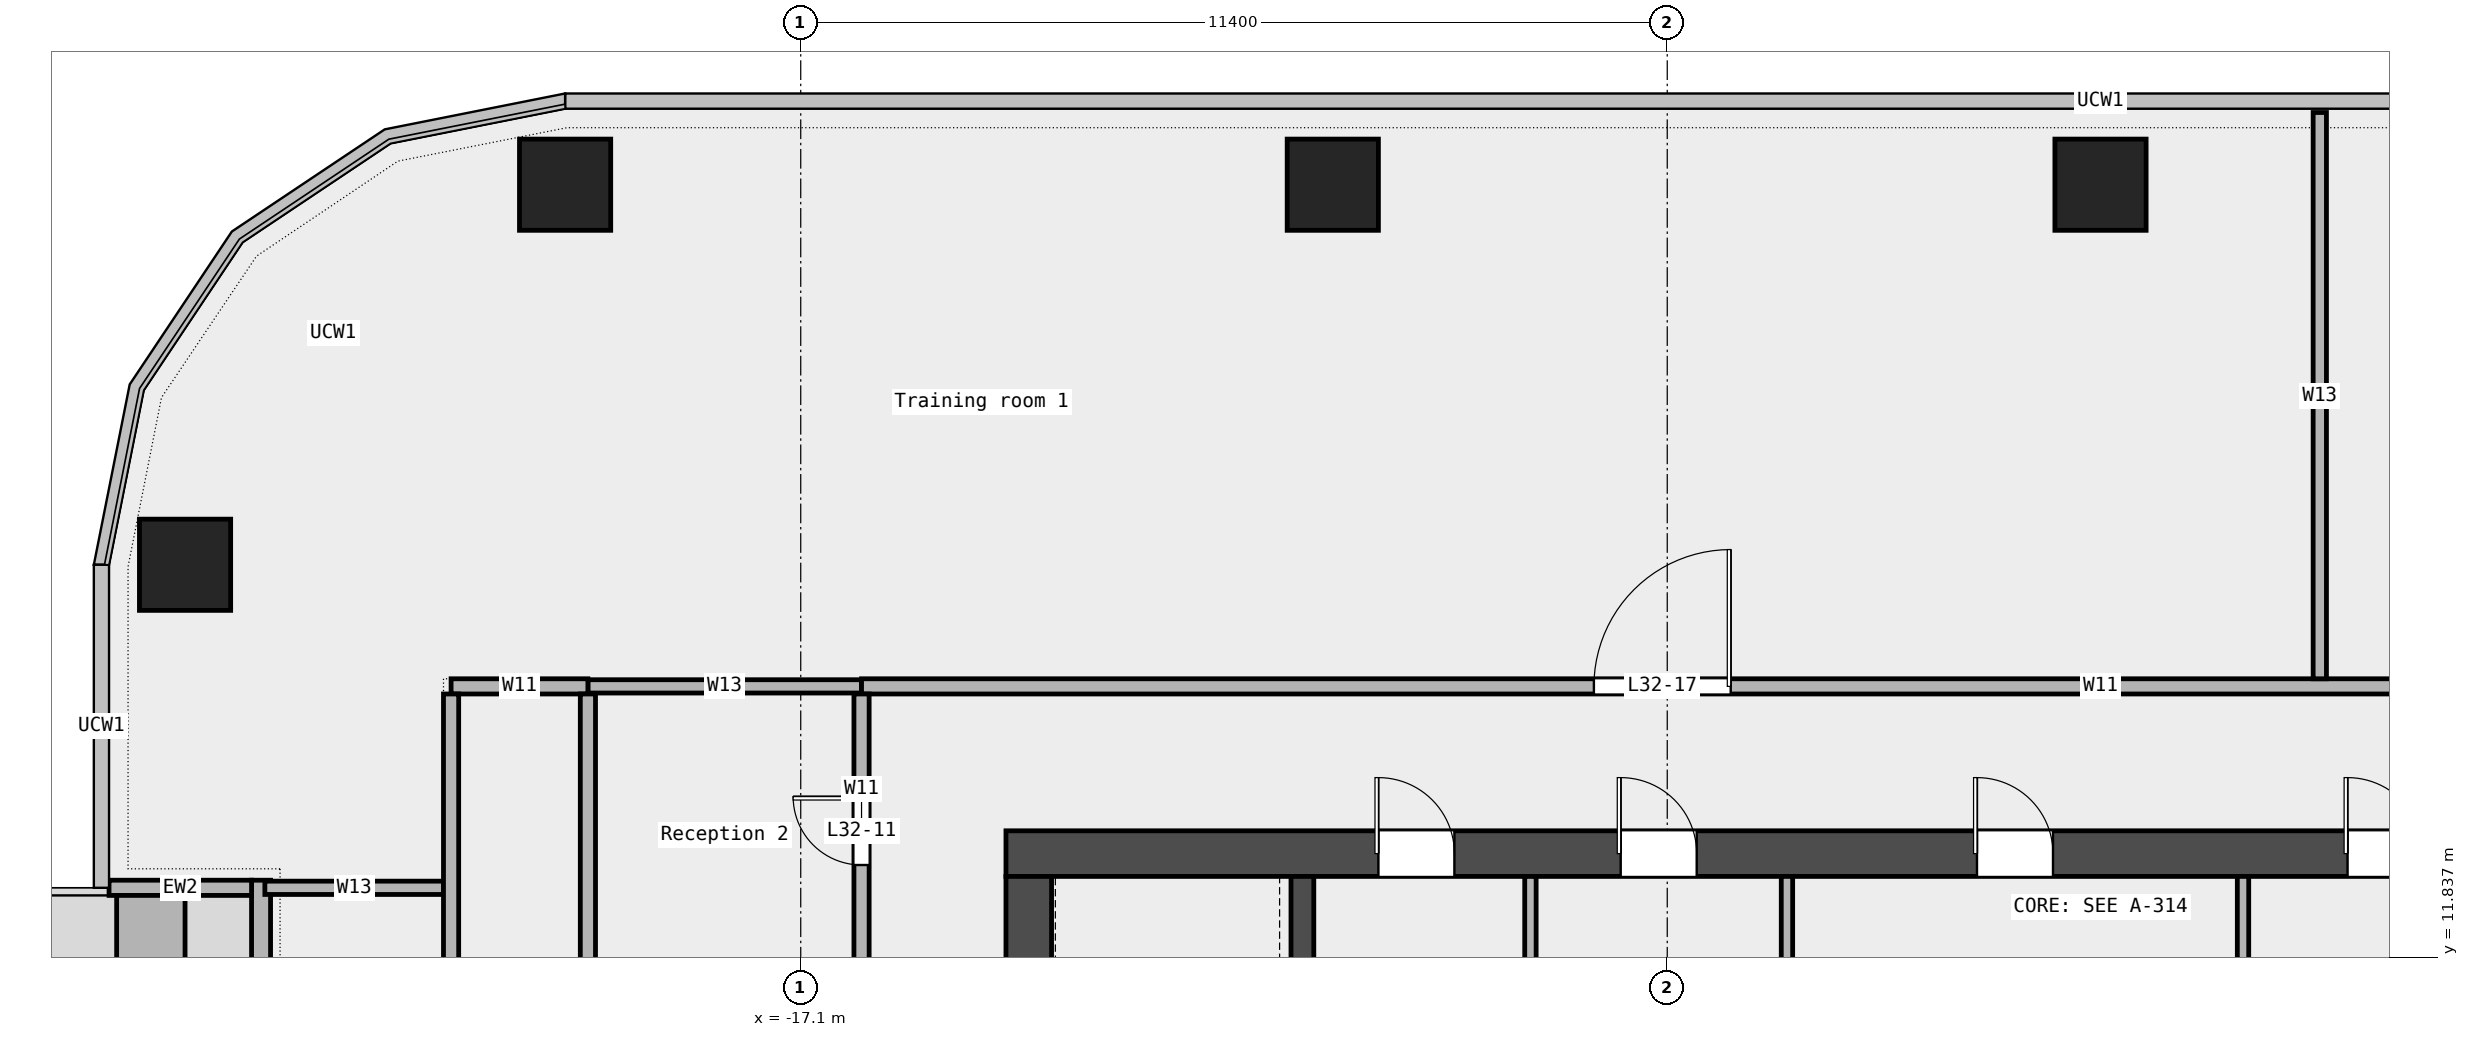
"""IFC4 building model, lengths in metres.
Left out: names, types, materials, properties, quantities, classifications, styles, units other than length and angle.
Written with IfcOpenShell. Run it as: python <this file> out.ifc"""

import sys

from ifc_helpers import new_model, si_unit, direction, frame, frame_2d, origin, origin_2d, place, context, subcontext, project, spatial, rectangle, extrude, element, fill, save


model = new_model("IFC4")
c1 = context("Model", 3, precision=1e-05, world=origin(), true_north=direction((0.0, 1.0)))
c2 = subcontext(c1, "Body", "Model", "MODEL_VIEW")
j1 = project(units=[si_unit("LENGTHUNIT", "METRE"), si_unit("PLANEANGLEUNIT", "RADIAN")], contexts=[c1])
p1 = place(None, origin())
s1 = spatial("IfcSite", under=j1, at=p1, CompositionType="ELEMENT")
p2 = place(p1, origin())
s2 = spatial("IfcBuilding", under=s1, at=p2, CompositionType="ELEMENT")
p3 = place(p2, frame((0.0, 0.0, 161.0)))
s3 = spatial("IfcBuildingStorey", under=s2, at=p3, CompositionType="ELEMENT", Elevation=161.0)
for number, where, z_axis, x_axis in (
    (1, (0.0, 22.0, 0.0), (0.0, 0.0, 1.0), (1.0, 0.0, 0.0)),
    (2, (-10.1, 22.0, 0.0), (0.0, 0.0, 1.0), (1.0, 0.0, 0.0)),
    (3, (-20.2, 22.0, 0.0), (0.0, 0.0, 1.0), (1.0, 0.0, 0.0)),
    (4, (-25.2, 17.0, 0.0), (0.0, 0.0, 1.0), (1.0, 0.0, 0.0)),
):
    element("IfcColumn", number, at=place(p3, frame(where, z_axis=z_axis, x_axis=x_axis)), inside=s3, PredefinedType="COLUMN", context=c2, shape_type="SweptSolid", body=[
        extrude(rectangle(XDim=1.2, YDim=1.2, at=origin_2d()), origin(), (0.0, 0.0, 1.0), 3.6),
    ])
p4 = place(p3, frame((-24.2, 12.85, 0.0), z_axis=(0.0, 0.0, 1.0), x_axis=(0.0, -1.0, 0.0)))
e5 = element("IfcWall", 5, at=p4, inside=s3, PredefinedType="STANDARD", context=c2, shape_type="SweptSolid", body=[
    extrude(rectangle(XDim=12.95, YDim=0.25, at=frame_2d((6.475, 0.0))), origin(), (0.0, 0.0, 1.0), 3.6),
])
p5 = place(p4, frame((1.5, 0.0, 0.45)))
e6 = element("IfcOpeningElement", 6, at=p5, cuts=e5, PredefinedType="OPENING", context=c2, shape_type="SweptSolid", body=[
    extrude(rectangle(XDim=1.5, YDim=2.4, at=frame_2d((0.75, 1.2))), frame((0.0, 0.137, 0.0), z_axis=(0.0, -1.0, 0.0), x_axis=(1.0, 0.0, 0.0)), (0.0, 0.0, 1.0), 0.274),
])
p6 = place(p4, frame((4.25, 0.0, 0.0)))
e7 = element("IfcOpeningElement", 7, at=p6, cuts=e5, PredefinedType="OPENING", context=c2, shape_type="SweptSolid", body=[
    extrude(rectangle(XDim=1.8, YDim=2.4, at=frame_2d((0.9, 1.2))), frame((0.0, 0.137, 0.0), z_axis=(0.0, -1.0, 0.0), x_axis=(1.0, 0.0, 0.0)), (0.0, 0.0, 1.0), 0.274),
])
p7 = place(p4, frame((10.0, 0.0, 0.45)))
e8 = element("IfcOpeningElement", 8, at=p7, cuts=e5, PredefinedType="OPENING", context=c2, shape_type="SweptSolid", body=[
    extrude(rectangle(XDim=1.5, YDim=2.4, at=frame_2d((0.75, 1.2))), frame((0.0, 0.137, 0.0), z_axis=(0.0, -1.0, 0.0), x_axis=(1.0, 0.0, 0.0)), (0.0, 0.0, 1.0), 0.274),
])
p8 = place(p3, frame((-26.2, 12.75, 0.0), z_axis=(0.0, 0.0, 1.0), x_axis=(1.0, 0.0, 0.0)))
e9 = element("IfcWall", 9, at=p8, inside=s3, PredefinedType="STANDARD", context=c2, shape_type="SweptSolid", body=[
    extrude(rectangle(XDim=1.875, YDim=0.2, at=frame_2d((0.938, 0.0))), origin(), (0.0, 0.0, 1.0), 3.6),
])
p9 = place(p3, frame((-25.65, 12.65, 0.0), z_axis=(0.0, 0.0, 1.0), x_axis=(0.0, -1.0, 0.0)))
e10 = element("IfcWall", 10, at=p9, inside=s3, PredefinedType="STANDARD", context=c2, shape_type="SweptSolid", body=[
    extrude(rectangle(XDim=3.6, YDim=0.9, at=frame_2d((1.8, 0.0))), origin(), (0.0, 0.0, 1.0), 0.7),
])
p10 = place(p3, frame((-24.15, 12.75, 0.0), z_axis=(0.0, 0.0, 1.0), x_axis=(1.0, 0.0, 0.0)))
e11 = element("IfcWall", 11, at=p10, inside=s3, PredefinedType="PARTITIONING", context=c2, shape_type="SweptSolid", body=[
    extrude(rectangle(XDim=2.35, YDim=0.175, at=frame_2d((1.175, 0.0))), origin(), (0.0, 0.0, 1.0), 3.6),
])
p11 = place(p3, frame((-19.9, 15.4, 0.0), z_axis=(0.0, 0.0, 1.0), x_axis=(1.0, 0.0, 0.0)))
e12 = element("IfcWall", 12, at=p11, inside=s3, PredefinedType="PARTITIONING", context=c2, shape_type="SweptSolid", body=[
    extrude(rectangle(XDim=3.6, YDim=0.175, at=frame_2d((1.8, 0.0))), origin(), (0.0, 0.0, 1.0), 3.6),
])
p12 = place(p3, frame((-21.7, 15.4, 0.0), z_axis=(0.0, 0.0, 1.0), x_axis=(1.0, 0.0, 0.0)))
e13 = element("IfcWall", 13, at=p12, inside=s3, PredefinedType="PARTITIONING", context=c2, shape_type="SweptSolid", body=[
    extrude(rectangle(XDim=1.8, YDim=0.2, at=frame_2d((0.9, 0.0))), origin(), (0.0, 0.0, 1.0), 3.6),
])
p13 = place(p3, frame((-16.3, 15.4, 0.0), z_axis=(0.0, 0.0, 1.0), x_axis=(1.0, 0.0, 0.0)))
e14 = element("IfcWall", 14, at=p13, inside=s3, PredefinedType="PARTITIONING", context=c2, shape_type="SweptSolid", body=[
    extrude(rectangle(XDim=32.6, YDim=0.2, at=frame_2d((16.3, 0.0))), origin(), (0.0, 0.0, 1.0), 3.6),
])
p14 = place(p13, frame((24.992, 0.0, 0.0)))
e15 = element("IfcOpeningElement", 15, at=p14, cuts=e14, PredefinedType="OPENING", context=c2, shape_type="SweptSolid", body=[
    extrude(rectangle(XDim=1.8, YDim=2.1, at=frame_2d((0.9, 1.05))), frame((0.0, 0.112, 0.0), z_axis=(0.0, -1.0, 0.0), x_axis=(1.0, 0.0, 0.0)), (0.0, 0.0, 1.0), 0.224),
])
p15 = place(p13, frame((9.635, 0.0, 0.0)))
e16 = element("IfcOpeningElement", 16, at=p15, cuts=e14, PredefinedType="OPENING", context=c2, shape_type="SweptSolid", body=[
    extrude(rectangle(XDim=1.8, YDim=2.1, at=frame_2d((0.9, 1.05))), frame((0.0, 0.112, 0.0), z_axis=(0.0, -1.0, 0.0), x_axis=(1.0, 0.0, 0.0)), (0.0, 0.0, 1.0), 0.224),
])
p16 = place(p3, frame((-21.7, -9.0, 0.0), z_axis=(0.0, 0.0, 1.0), x_axis=(0.0, 1.0, 0.0)))
e17 = element("IfcWall", 17, at=p16, inside=s3, PredefinedType="PARTITIONING", context=c2, shape_type="SweptSolid", body=[
    extrude(rectangle(XDim=24.3, YDim=0.2, at=frame_2d((12.15, 0.0))), origin(), (0.0, 0.0, 1.0), 3.6),
])
p17 = place(p16, frame((14.925, 0.0, 0.0)))
e18 = element("IfcOpeningElement", 18, at=p17, cuts=e17, PredefinedType="OPENING", context=c2, shape_type="SweptSolid", body=[
    extrude(rectangle(XDim=0.9, YDim=2.1, at=frame_2d((0.45, 1.05))), frame((0.0, 0.112, 0.0), z_axis=(0.0, -1.0, 0.0), x_axis=(1.0, 0.0, 0.0)), (0.0, 0.0, 1.0), 0.224),
])
p18 = place(p16, frame((4.05, 0.0, 0.0)))
e19 = element("IfcOpeningElement", 19, at=p18, cuts=e17, PredefinedType="OPENING", context=c2, shape_type="SweptSolid", body=[
    extrude(rectangle(XDim=0.9, YDim=2.1, at=frame_2d((0.45, 1.05))), frame((0.0, 0.112, 0.0), z_axis=(0.0, -1.0, 0.0), x_axis=(1.0, 0.0, 0.0)), (0.0, 0.0, 1.0), 0.224),
])
p19 = place(p3, frame((-19.9, 4.15, 0.0), z_axis=(0.0, 0.0, 1.0), x_axis=(0.0, 1.0, 0.0)))
e20 = element("IfcWall", 20, at=p19, inside=s3, PredefinedType="PARTITIONING", context=c2, shape_type="SweptSolid", body=[
    extrude(rectangle(XDim=11.15, YDim=0.2, at=frame_2d((5.575, 0.0))), origin(), (0.0, 0.0, 1.0), 3.6),
])
p20 = place(p3, frame((-16.3, 11.7, 0.0), z_axis=(0.0, 0.0, 1.0), x_axis=(0.0, 1.0, 0.0)))
e21 = element("IfcWall", 21, at=p20, inside=s3, PredefinedType="PARTITIONING", context=c2, shape_type="SweptSolid", body=[
    extrude(rectangle(XDim=3.6, YDim=0.2, at=frame_2d((1.8, 0.0))), origin(), (0.0, 0.0, 1.0), 3.6),
])
p21 = place(p20, frame((1.35, 0.0, 0.0)))
e22 = element("IfcOpeningElement", 22, at=p21, cuts=e21, PredefinedType="OPENING", context=c2, shape_type="SweptSolid", body=[
    extrude(rectangle(XDim=0.9, YDim=2.1, at=frame_2d((0.45, 1.05))), frame((0.0, 0.112, 0.0), z_axis=(0.0, -1.0, 0.0), x_axis=(1.0, 0.0, 0.0)), (0.0, 0.0, 1.0), 0.224),
])
p22 = place(p3, frame((2.885, 15.5, 0.0), z_axis=(0.0, 0.0, 1.0), x_axis=(0.0, 1.0, 0.0)))
e23 = element("IfcWall", 23, at=p22, inside=s3, PredefinedType="PARTITIONING", context=c2, shape_type="SweptSolid", body=[
    extrude(rectangle(XDim=7.45, YDim=0.175, at=frame_2d((3.725, 0.0))), origin(), (0.0, 0.0, 1.0), 3.6),
])
p23 = place(p3, frame((-14.4, 13.2, 0.0), z_axis=(0.0, 0.0, 1.0), x_axis=(1.0, 0.0, 0.0)))
e24 = element("IfcWall", 24, at=p23, inside=s3, PredefinedType="SHEAR", context=c2, shape_type="SweptSolid", body=[
    extrude(rectangle(XDim=28.8, YDim=0.6, at=frame_2d((14.4, 0.0))), origin(), (0.0, 0.0, 1.0), 3.7),
])
p24 = place(p23, frame((4.9, 0.0, 0.0)))
e25 = element("IfcOpeningElement", 25, at=p24, cuts=e24, PredefinedType="OPENING", context=c2, shape_type="SweptSolid", body=[
    extrude(rectangle(XDim=1.0, YDim=2.1, at=frame_2d((0.5, 1.05))), frame((0.0, 0.312, 0.0), z_axis=(0.0, -1.0, 0.0), x_axis=(1.0, 0.0, 0.0)), (0.0, 0.0, 1.0), 0.624),
])
p25 = place(p23, frame((8.087, 0.0, 0.0)))
e26 = element("IfcOpeningElement", 26, at=p25, cuts=e24, PredefinedType="OPENING", context=c2, shape_type="SweptSolid", body=[
    extrude(rectangle(XDim=1.0, YDim=2.1, at=frame_2d((0.5, 1.05))), frame((0.0, 0.312, 0.0), z_axis=(0.0, -1.0, 0.0), x_axis=(1.0, 0.0, 0.0)), (0.0, 0.0, 1.0), 0.624),
])
p26 = place(p23, frame((12.775, 0.0, 0.0)))
e27 = element("IfcOpeningElement", 27, at=p26, cuts=e24, PredefinedType="OPENING", context=c2, shape_type="SweptSolid", body=[
    extrude(rectangle(XDim=1.0, YDim=2.1, at=frame_2d((0.5, 1.05))), frame((0.0, 0.312, 0.0), z_axis=(0.0, -1.0, 0.0), x_axis=(1.0, 0.0, 0.0)), (0.0, 0.0, 1.0), 0.624),
])
p27 = place(p23, frame((17.65, 0.0, 0.0)))
e28 = element("IfcOpeningElement", 28, at=p27, cuts=e24, PredefinedType="OPENING", context=c2, shape_type="SweptSolid", body=[
    extrude(rectangle(XDim=1.0, YDim=2.1, at=frame_2d((0.5, 1.05))), frame((0.0, 0.312, 0.0), z_axis=(0.0, -1.0, 0.0), x_axis=(1.0, 0.0, 0.0)), (0.0, 0.0, 1.0), 0.624),
])
p28 = place(p23, frame((21.962, 0.0, 0.0)))
e29 = element("IfcOpeningElement", 29, at=p28, cuts=e24, PredefinedType="OPENING", context=c2, shape_type="SweptSolid", body=[
    extrude(rectangle(XDim=1.0, YDim=2.1, at=frame_2d((0.5, 1.05))), frame((0.0, 0.312, 0.0), z_axis=(0.0, -1.0, 0.0), x_axis=(1.0, 0.0, 0.0)), (0.0, 0.0, 1.0), 0.624),
])
p29 = place(p3, frame((-14.1, -6.6, 0.0), z_axis=(0.0, 0.0, 1.0), x_axis=(0.0, 1.0, 0.0)))
e30 = element("IfcWall", 30, at=p29, inside=s3, PredefinedType="SHEAR", context=c2, shape_type="SweptSolid", body=[
    extrude(rectangle(XDim=19.5, YDim=0.6, at=frame_2d((9.75, 0.0))), origin(), (0.0, 0.0, 1.0), 3.7),
])
p30 = place(p29, frame((9.3, 0.0, 0.0)))
e31 = element("IfcOpeningElement", 31, at=p30, cuts=e30, PredefinedType="OPENING", context=c2, shape_type="SweptSolid", body=[
    extrude(rectangle(XDim=1.8, YDim=2.1, at=frame_2d((0.9, 1.05))), frame((0.0, 0.312, 0.0), z_axis=(0.0, -1.0, 0.0), x_axis=(1.0, 0.0, 0.0)), (0.0, 0.0, 1.0), 0.624),
])
p31 = place(p3, frame((-10.5, 5.25, 0.0), z_axis=(0.0, 0.0, 1.0), x_axis=(0.0, 1.0, 0.0)))
e32 = element("IfcWall", 32, at=p31, inside=s3, PredefinedType="SHEAR", context=c2, shape_type="SweptSolid", body=[
    extrude(rectangle(XDim=7.65, YDim=0.3, at=frame_2d((3.825, 0.0))), origin(), (0.0, 0.0, 1.0), 3.7),
])
for number, where, z_axis, x_axis in (
    (33, (-7.5, 8.55, 0.0), (0.0, 0.0, 1.0), (0.0, 1.0, 0.0)),
    (34, (-4.125, 8.55, 0.0), (0.0, 0.0, 1.0), (0.0, 1.0, 0.0)),
    (35, (1.875, 8.55, 0.0), (0.0, 0.0, 1.0), (0.0, 1.0, 0.0)),
):
    element("IfcWall", number, at=place(p3, frame(where, z_axis=z_axis, x_axis=x_axis)), inside=s3, PredefinedType="PARTITIONING", context=c2, shape_type="SweptSolid", body=[
        extrude(rectangle(XDim=4.35, YDim=0.15, at=frame_2d((2.175, 0.0))), origin(), (0.0, 0.0, 1.0), 3.7),
    ])
p32 = place(p21, origin())
e36 = element("IfcDoor", 36, at=p32, inside=s3, OperationType="SINGLE_SWING_RIGHT", PredefinedType="DOOR", context=c2, shape_type="SweptSolid", body=[
    extrude(rectangle(XDim=0.9, YDim=2.1, at=frame_2d((0.45, 1.05))), frame((0.0, 0.025, 0.0), z_axis=(0.0, -1.0, 0.0), x_axis=(1.0, 0.0, 0.0)), (0.0, 0.0, 1.0), 0.05),
])
fill(e22, e36)
p33 = place(p15, origin())
e37 = element("IfcDoor", 37, at=p33, inside=s3, OperationType="DOUBLE_DOOR_SINGLE_SWING", PredefinedType="DOOR", context=c2, shape_type="SweptSolid", body=[
    extrude(rectangle(XDim=1.8, YDim=2.1, at=frame_2d((0.9, 1.05))), frame((0.0, 0.025, 0.0), z_axis=(0.0, -1.0, 0.0), x_axis=(1.0, 0.0, 0.0)), (0.0, 0.0, 1.0), 0.05),
])
fill(e16, e37)
p34 = place(p24, origin())
e38 = element("IfcDoor", 38, at=p34, inside=s3, OperationType="SINGLE_SWING_LEFT", PredefinedType="DOOR", context=c2, shape_type="SweptSolid", body=[
    extrude(rectangle(XDim=1.0, YDim=2.1, at=frame_2d((0.5, 1.05))), frame((0.0, 0.025, 0.0), z_axis=(0.0, -1.0, 0.0), x_axis=(1.0, 0.0, 0.0)), (0.0, 0.0, 1.0), 0.05),
])
fill(e25, e38)
p35 = place(p25, origin())
e39 = element("IfcDoor", 39, at=p35, inside=s3, OperationType="SINGLE_SWING_LEFT", PredefinedType="DOOR", context=c2, shape_type="SweptSolid", body=[
    extrude(rectangle(XDim=1.0, YDim=2.1, at=frame_2d((0.5, 1.05))), frame((0.0, 0.025, 0.0), z_axis=(0.0, -1.0, 0.0), x_axis=(1.0, 0.0, 0.0)), (0.0, 0.0, 1.0), 0.05),
])
fill(e26, e39)
p36 = place(p26, origin())
e40 = element("IfcDoor", 40, at=p36, inside=s3, OperationType="SINGLE_SWING_LEFT", PredefinedType="DOOR", context=c2, shape_type="SweptSolid", body=[
    extrude(rectangle(XDim=1.0, YDim=2.1, at=frame_2d((0.5, 1.05))), frame((0.0, 0.025, 0.0), z_axis=(0.0, -1.0, 0.0), x_axis=(1.0, 0.0, 0.0)), (0.0, 0.0, 1.0), 0.05),
])
fill(e27, e40)
p37 = place(p27, origin())
e41 = element("IfcDoor", 41, at=p37, inside=s3, OperationType="SINGLE_SWING_LEFT", PredefinedType="DOOR", context=c2, shape_type="SweptSolid", body=[
    extrude(rectangle(XDim=1.0, YDim=2.1, at=frame_2d((0.5, 1.05))), frame((0.0, 0.025, 0.0), z_axis=(0.0, -1.0, 0.0), x_axis=(1.0, 0.0, 0.0)), (0.0, 0.0, 1.0), 0.05),
])
fill(e28, e41)
save(model, sys.argv[1])
